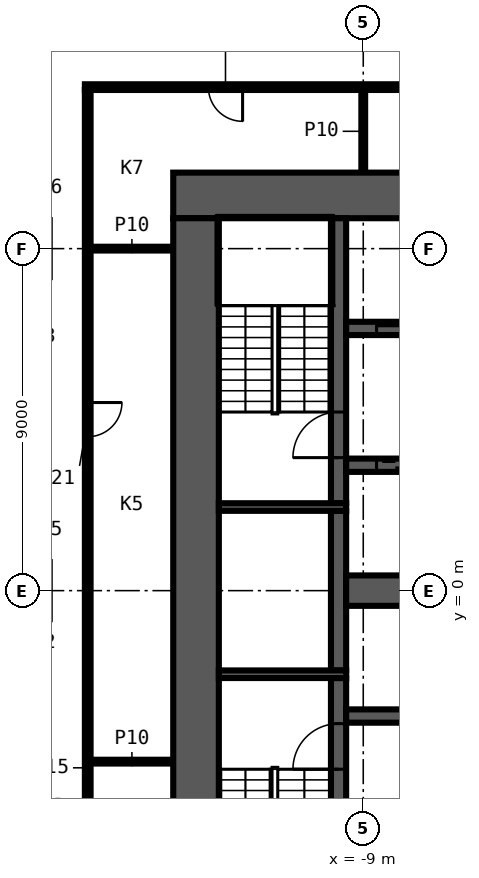
"""IFC4 building model, lengths in metres.
Left out: names, types, materials, properties, quantities, classifications, styles, units other than length and angle.
Written with IfcOpenShell. Run it as: python <this file> out.ifc"""

import sys

from ifc_helpers import new_model, si_unit, direction, frame, frame_2d, origin, place, context, subcontext, project, spatial, rectangle, extrude, element, fill, save


model = new_model("IFC4")
c1 = context("Model", 3, precision=1e-05, world=origin(), true_north=direction((0.0, 1.0)))
c2 = subcontext(c1, "Body", "Model", "MODEL_VIEW")
j1 = project(units=[si_unit("LENGTHUNIT", "METRE"), si_unit("PLANEANGLEUNIT", "RADIAN")], contexts=[c1])
p1 = place(None, origin())
s1 = spatial("IfcSite", under=j1, at=p1, CompositionType="ELEMENT")
p2 = place(p1, origin())
s2 = spatial("IfcBuilding", under=s1, at=p2, CompositionType="ELEMENT")
p3 = place(p2, frame((0.0, 0.0, 81.0)))
s3 = spatial("IfcBuildingStorey", under=s2, at=p3, CompositionType="ELEMENT", Elevation=81.0)
for number, where, z_axis, x_axis in (
    (1, (-16.175, -4.5, 0.0), (0.0, 0.0, 1.0), (1.0, 0.0, 0.0)),
    (2, (-16.175, 9.0, 0.0), (0.0, 0.0, 1.0), (1.0, 0.0, 0.0)),
):
    element("IfcWall", number, at=place(p3, frame(where, z_axis=z_axis, x_axis=x_axis)), inside=s3, PredefinedType="PARTITIONING", context=c2, shape_type="SweptSolid", body=[
        extrude(rectangle(XDim=2.175, YDim=0.1, at=frame_2d((1.087, 0.0))), origin(), (0.0, 0.0, 1.0), 3.3),
    ])
p4 = place(p3, frame((1.425, 13.25, 0.0), z_axis=(0.0, 0.0, 1.0), x_axis=(-1.0, 0.0, 0.0)))
e3 = element("IfcWall", 3, at=p4, inside=s3, PredefinedType="PARTITIONING", context=c2, shape_type="SweptSolid", body=[
    extrude(rectangle(XDim=17.75, YDim=0.15, at=frame_2d((8.875, 0.0))), origin(), (0.0, 0.0, 1.0), 3.3),
])
p5 = place(p4, frame((7.725, 0.0, 0.0)))
e4 = element("IfcOpeningElement", 4, at=p5, cuts=e3, PredefinedType="OPENING", context=c2, shape_type="SweptSolid", body=[
    extrude(rectangle(XDim=0.9, YDim=2.1, at=frame_2d((0.45, 1.05))), frame((0.0, 0.085, 0.0), z_axis=(0.0, -1.0, 0.0), x_axis=(1.0, 0.0, 0.0)), (0.0, 0.0, 1.0), 0.17),
])
p6 = place(p4, frame((13.6, 0.0, 0.0)))
e5 = element("IfcOpeningElement", 5, at=p6, cuts=e3, PredefinedType="OPENING", context=c2, shape_type="SweptSolid", body=[
    extrude(rectangle(XDim=0.9, YDim=2.1, at=frame_2d((0.45, 1.05))), frame((0.0, 0.085, 0.0), z_axis=(0.0, -1.0, 0.0), x_axis=(1.0, 0.0, 0.0)), (0.0, 0.0, 1.0), 0.17),
])
p7 = place(p3, frame((-9.0, 11.0, 0.0), z_axis=(0.0, 0.0, 1.0), x_axis=(0.0, 1.0, 0.0)))
e6 = element("IfcWall", 6, at=p7, inside=s3, PredefinedType="PARTITIONING", context=c2, shape_type="SweptSolid", body=[
    extrude(rectangle(XDim=2.175, YDim=0.1, at=frame_2d((1.087, 0.0))), origin(), (0.0, 0.0, 1.0), 3.3),
])
p8 = place(p3, frame((-16.25, 13.175, 0.0), z_axis=(0.0, 0.0, 1.0), x_axis=(0.0, -1.0, 0.0)))
e7 = element("IfcWall", 7, at=p8, inside=s3, PredefinedType="PARTITIONING", context=c2, shape_type="SweptSolid", body=[
    extrude(rectangle(XDim=26.35, YDim=0.15, at=frame_2d((13.175, 0.0))), origin(), (0.0, 0.0, 1.0), 3.3),
])
p9 = place(p8, frame((8.225, 0.0, 0.0)))
e8 = element("IfcOpeningElement", 8, at=p9, cuts=e7, PredefinedType="OPENING", context=c2, shape_type="SweptSolid", body=[
    extrude(rectangle(XDim=0.9, YDim=2.1, at=frame_2d((0.45, 1.05))), frame((0.0, 0.085, 0.0), z_axis=(0.0, -1.0, 0.0), x_axis=(1.0, 0.0, 0.0)), (0.0, 0.0, 1.0), 0.17),
])
p10 = place(p3, frame((-14.0, 10.4, 0.0), z_axis=(0.0, 0.0, 1.0), x_axis=(1.0, 0.0, 0.0)))
e9 = element("IfcWall", 9, at=p10, inside=s3, PredefinedType="SHEAR", context=c2, shape_type="SweptSolid", body=[
    extrude(rectangle(XDim=28.0, YDim=1.2, at=frame_2d((14.0, 0.0))), origin(), (0.0, 0.0, 1.0), 3.3),
])
p11 = place(p10, frame((15.9, 0.0, 0.0)))
e10 = element("IfcOpeningElement", 10, at=p11, cuts=e9, PredefinedType="OPENING", context=c2, shape_type="SweptSolid", body=[
    extrude(rectangle(XDim=1.6, YDim=2.1, at=frame_2d((0.8, 1.05))), frame((0.0, 0.61, 0.0), z_axis=(0.0, -1.0, 0.0), x_axis=(1.0, 0.0, 0.0)), (0.0, 0.0, 1.0), 1.22),
])
p12 = place(p3, frame((-13.4, -9.8, 0.0), z_axis=(0.0, 0.0, 1.0), x_axis=(0.0, 1.0, 0.0)))
e11 = element("IfcWall", 11, at=p12, inside=s3, PredefinedType="SHEAR", context=c2, shape_type="SweptSolid", body=[
    extrude(rectangle(XDim=19.6, YDim=1.2, at=frame_2d((9.8, 0.0))), origin(), (0.0, 0.0, 1.0), 3.3),
])
p13 = place(p3, frame((-9.65, -9.8, 0.0), z_axis=(0.0, 0.0, 1.0), x_axis=(0.0, 1.0, 0.0)))
e12 = element("IfcWall", 12, at=p13, inside=s3, PredefinedType="SHEAR", context=c2, shape_type="SweptSolid", body=[
    extrude(rectangle(XDim=7.5, YDim=0.4, at=frame_2d((3.75, 0.0))), origin(), (0.0, 0.0, 1.0), 3.3),
])
p14 = place(p13, frame((5.1, 0.0, 0.0)))
e13 = element("IfcOpeningElement", 13, at=p14, cuts=e12, PredefinedType="OPENING", context=c2, shape_type="SweptSolid", body=[
    extrude(rectangle(XDim=1.2, YDim=2.1, at=frame_2d((0.6, 1.05))), frame((0.0, 0.21, 0.0), z_axis=(0.0, -1.0, 0.0), x_axis=(1.0, 0.0, 0.0)), (0.0, 0.0, 1.0), 0.42),
])
p15 = place(p3, frame((-9.65, -2.1, 0.0), z_axis=(0.0, 0.0, 1.0), x_axis=(0.0, 1.0, 0.0)))
e14 = element("IfcWall", 14, at=p15, inside=s3, PredefinedType="SHEAR", context=c2, shape_type="SweptSolid", body=[
    extrude(rectangle(XDim=4.2, YDim=0.4, at=frame_2d((2.1, 0.0))), origin(), (0.0, 0.0, 1.0), 3.3),
])
p16 = place(p3, frame((-9.65, 2.3, 0.0), z_axis=(0.0, 0.0, 1.0), x_axis=(0.0, 1.0, 0.0)))
e15 = element("IfcWall", 15, at=p16, inside=s3, PredefinedType="SHEAR", context=c2, shape_type="SweptSolid", body=[
    extrude(rectangle(XDim=7.5, YDim=0.4, at=frame_2d((3.75, 0.0))), origin(), (0.0, 0.0, 1.0), 3.3),
])
p17 = place(p16, frame((1.2, 0.0, 0.0)))
e16 = element("IfcOpeningElement", 16, at=p17, cuts=e15, PredefinedType="OPENING", context=c2, shape_type="SweptSolid", body=[
    extrude(rectangle(XDim=1.2, YDim=2.1, at=frame_2d((0.6, 1.05))), frame((0.0, 0.21, 0.0), z_axis=(0.0, -1.0, 0.0), x_axis=(1.0, 0.0, 0.0)), (0.0, 0.0, 1.0), 0.42),
])
for number, where, z_axis, x_axis in (
    (17, (-9.45, 2.2, 0.0), (0.0, 0.0, 1.0), (-1.0, 0.0, 0.0)),
    (18, (-9.45, -2.2, 0.0), (0.0, 0.0, 1.0), (-1.0, 0.0, 0.0)),
):
    element("IfcWall", number, at=place(p3, frame(where, z_axis=z_axis, x_axis=x_axis)), inside=s3, PredefinedType="SHEAR", context=c2, shape_type="SweptSolid", body=[
        extrude(rectangle(XDim=3.35, YDim=0.2, at=frame_2d((1.675, 0.0))), origin(), (0.0, 0.0, 1.0), 3.3),
    ])
p18 = place(p3, frame((-9.45, 6.9, 0.0), z_axis=(0.0, 0.0, 1.0), x_axis=(1.0, 0.0, 0.0)))
e19 = element("IfcWall", 19, at=p18, inside=s3, PredefinedType="SHEAR", context=c2, shape_type="SweptSolid", body=[
    extrude(rectangle(XDim=18.9, YDim=0.35, at=frame_2d((9.45, 0.0))), origin(), (0.0, 0.0, 1.0), 3.3),
])
p19 = place(p18, frame((0.8, 0.0, 0.0)))
e20 = element("IfcOpeningElement", 20, at=p19, cuts=e19, PredefinedType="OPENING", context=c2, shape_type="SweptSolid", body=[
    extrude(rectangle(XDim=1.1, YDim=2.1, at=frame_2d((0.55, 1.05))), frame((0.0, 0.185, 0.0), z_axis=(0.0, -1.0, 0.0), x_axis=(1.0, 0.0, 0.0)), (0.0, 0.0, 1.0), 0.37),
])
p20 = place(p18, frame((3.5, 0.0, 0.0)))
e21 = element("IfcOpeningElement", 21, at=p20, cuts=e19, PredefinedType="OPENING", context=c2, shape_type="SweptSolid", body=[
    extrude(rectangle(XDim=1.1, YDim=2.1, at=frame_2d((0.55, 1.05))), frame((0.0, 0.185, 0.0), z_axis=(0.0, -1.0, 0.0), x_axis=(1.0, 0.0, 0.0)), (0.0, 0.0, 1.0), 0.37),
])
p21 = place(p18, frame((6.2, 0.0, 0.0)))
e22 = element("IfcOpeningElement", 22, at=p21, cuts=e19, PredefinedType="OPENING", context=c2, shape_type="SweptSolid", body=[
    extrude(rectangle(XDim=1.1, YDim=2.1, at=frame_2d((0.55, 1.05))), frame((0.0, 0.185, 0.0), z_axis=(0.0, -1.0, 0.0), x_axis=(1.0, 0.0, 0.0)), (0.0, 0.0, 1.0), 0.37),
])
p22 = place(p18, frame((8.9, 0.0, 0.0)))
e23 = element("IfcOpeningElement", 23, at=p22, cuts=e19, PredefinedType="OPENING", context=c2, shape_type="SweptSolid", body=[
    extrude(rectangle(XDim=1.1, YDim=2.1, at=frame_2d((0.55, 1.05))), frame((0.0, 0.185, 0.0), z_axis=(0.0, -1.0, 0.0), x_axis=(1.0, 0.0, 0.0)), (0.0, 0.0, 1.0), 0.37),
])
p23 = place(p18, frame((11.55, 0.0, 0.0)))
e24 = element("IfcOpeningElement", 24, at=p23, cuts=e19, PredefinedType="OPENING", context=c2, shape_type="SweptSolid", body=[
    extrude(rectangle(XDim=1.2, YDim=2.1, at=frame_2d((0.6, 1.05))), frame((0.0, 0.185, 0.0), z_axis=(0.0, -1.0, 0.0), x_axis=(1.0, 0.0, 0.0)), (0.0, 0.0, 1.0), 0.37),
])
p24 = place(p18, frame((14.3, 0.0, 0.0)))
e25 = element("IfcOpeningElement", 25, at=p24, cuts=e19, PredefinedType="OPENING", context=c2, shape_type="SweptSolid", body=[
    extrude(rectangle(XDim=1.1, YDim=2.1, at=frame_2d((0.55, 1.05))), frame((0.0, 0.185, 0.0), z_axis=(0.0, -1.0, 0.0), x_axis=(1.0, 0.0, 0.0)), (0.0, 0.0, 1.0), 0.37),
])
p25 = place(p18, frame((17.0, 0.0, 0.0)))
e26 = element("IfcOpeningElement", 26, at=p25, cuts=e19, PredefinedType="OPENING", context=c2, shape_type="SweptSolid", body=[
    extrude(rectangle(XDim=1.1, YDim=2.1, at=frame_2d((0.55, 1.05))), frame((0.0, 0.185, 0.0), z_axis=(0.0, -1.0, 0.0), x_axis=(1.0, 0.0, 0.0)), (0.0, 0.0, 1.0), 0.37),
])
p26 = place(p3, frame((9.45, 3.3, 0.0), z_axis=(0.0, 0.0, 1.0), x_axis=(-1.0, 0.0, 0.0)))
e27 = element("IfcWall", 27, at=p26, inside=s3, PredefinedType="SHEAR", context=c2, shape_type="SweptSolid", body=[
    extrude(rectangle(XDim=18.9, YDim=0.35, at=frame_2d((9.45, 0.0))), origin(), (0.0, 0.0, 1.0), 3.3),
])
p27 = place(p26, frame((17.0, 0.0, 0.0)))
e28 = element("IfcOpeningElement", 28, at=p27, cuts=e27, PredefinedType="OPENING", context=c2, shape_type="SweptSolid", body=[
    extrude(rectangle(XDim=1.1, YDim=2.1, at=frame_2d((0.55, 1.05))), frame((0.0, 0.185, 0.0), z_axis=(0.0, -1.0, 0.0), x_axis=(1.0, 0.0, 0.0)), (0.0, 0.0, 1.0), 0.37),
])
p28 = place(p26, frame((14.3, 0.0, 0.0)))
e29 = element("IfcOpeningElement", 29, at=p28, cuts=e27, PredefinedType="OPENING", context=c2, shape_type="SweptSolid", body=[
    extrude(rectangle(XDim=1.1, YDim=2.1, at=frame_2d((0.55, 1.05))), frame((0.0, 0.185, 0.0), z_axis=(0.0, -1.0, 0.0), x_axis=(1.0, 0.0, 0.0)), (0.0, 0.0, 1.0), 0.37),
])
p29 = place(p26, frame((11.6, 0.0, 0.0)))
e30 = element("IfcOpeningElement", 30, at=p29, cuts=e27, PredefinedType="OPENING", context=c2, shape_type="SweptSolid", body=[
    extrude(rectangle(XDim=1.1, YDim=2.1, at=frame_2d((0.55, 1.05))), frame((0.0, 0.185, 0.0), z_axis=(0.0, -1.0, 0.0), x_axis=(1.0, 0.0, 0.0)), (0.0, 0.0, 1.0), 0.37),
])
p30 = place(p26, frame((8.9, 0.0, 0.0)))
e31 = element("IfcOpeningElement", 31, at=p30, cuts=e27, PredefinedType="OPENING", context=c2, shape_type="SweptSolid", body=[
    extrude(rectangle(XDim=1.1, YDim=2.1, at=frame_2d((0.55, 1.05))), frame((0.0, 0.185, 0.0), z_axis=(0.0, -1.0, 0.0), x_axis=(1.0, 0.0, 0.0)), (0.0, 0.0, 1.0), 0.37),
])
p31 = place(p26, frame((6.2, 0.0, 0.0)))
e32 = element("IfcOpeningElement", 32, at=p31, cuts=e27, PredefinedType="OPENING", context=c2, shape_type="SweptSolid", body=[
    extrude(rectangle(XDim=1.1, YDim=2.1, at=frame_2d((0.55, 1.05))), frame((0.0, 0.185, 0.0), z_axis=(0.0, -1.0, 0.0), x_axis=(1.0, 0.0, 0.0)), (0.0, 0.0, 1.0), 0.37),
])
p32 = place(p26, frame((3.5, 0.0, 0.0)))
e33 = element("IfcOpeningElement", 33, at=p32, cuts=e27, PredefinedType="OPENING", context=c2, shape_type="SweptSolid", body=[
    extrude(rectangle(XDim=1.1, YDim=2.1, at=frame_2d((0.55, 1.05))), frame((0.0, 0.185, 0.0), z_axis=(0.0, -1.0, 0.0), x_axis=(1.0, 0.0, 0.0)), (0.0, 0.0, 1.0), 0.37),
])
p33 = place(p26, frame((0.9, 0.0, 0.0)))
e34 = element("IfcOpeningElement", 34, at=p33, cuts=e27, PredefinedType="OPENING", context=c2, shape_type="SweptSolid", body=[
    extrude(rectangle(XDim=0.9, YDim=2.1, at=frame_2d((0.45, 1.05))), frame((0.0, 0.185, 0.0), z_axis=(0.0, -1.0, 0.0), x_axis=(1.0, 0.0, 0.0)), (0.0, 0.0, 1.0), 0.37),
])
p34 = place(p3, frame((-9.45, -3.3, 0.0), z_axis=(0.0, 0.0, 1.0), x_axis=(1.0, 0.0, 0.0)))
e35 = element("IfcWall", 35, at=p34, inside=s3, PredefinedType="SHEAR", context=c2, shape_type="SweptSolid", body=[
    extrude(rectangle(XDim=18.9, YDim=0.35, at=frame_2d((9.45, 0.0))), origin(), (0.0, 0.0, 1.0), 3.3),
])
p35 = place(p34, frame((17.0, 0.0, 0.0)))
e36 = element("IfcOpeningElement", 36, at=p35, cuts=e35, PredefinedType="OPENING", context=c2, shape_type="SweptSolid", body=[
    extrude(rectangle(XDim=1.1, YDim=2.1, at=frame_2d((0.55, 1.05))), frame((0.0, 0.185, 0.0), z_axis=(0.0, -1.0, 0.0), x_axis=(1.0, 0.0, 0.0)), (0.0, 0.0, 1.0), 0.37),
])
p36 = place(p34, frame((3.6, 0.0, 0.0)))
e37 = element("IfcOpeningElement", 37, at=p36, cuts=e35, PredefinedType="OPENING", context=c2, shape_type="SweptSolid", body=[
    extrude(rectangle(XDim=0.9, YDim=2.1, at=frame_2d((0.45, 1.05))), frame((0.0, 0.185, 0.0), z_axis=(0.0, -1.0, 0.0), x_axis=(1.0, 0.0, 0.0)), (0.0, 0.0, 1.0), 0.37),
])
p37 = place(p34, frame((9.0, 0.0, 0.0)))
e38 = element("IfcOpeningElement", 38, at=p37, cuts=e35, PredefinedType="OPENING", context=c2, shape_type="SweptSolid", body=[
    extrude(rectangle(XDim=0.9, YDim=2.1, at=frame_2d((0.45, 1.05))), frame((0.0, 0.185, 0.0), z_axis=(0.0, -1.0, 0.0), x_axis=(1.0, 0.0, 0.0)), (0.0, 0.0, 1.0), 0.37),
])
p38 = place(p3, frame((-9.45, 0.0, 0.0), z_axis=(0.0, 0.0, 1.0), x_axis=(1.0, 0.0, 0.0)))
e39 = element("IfcWall", 39, at=p38, inside=s3, PredefinedType="SHEAR", context=c2, shape_type="SweptSolid", body=[
    extrude(rectangle(XDim=18.9, YDim=0.8, at=frame_2d((9.45, 0.0))), origin(), (0.0, 0.0, 1.0), 3.3),
])
p39 = place(p6, origin())
e40 = element("IfcDoor", 40, at=p39, inside=s3, OperationType="SINGLE_SWING_RIGHT", PredefinedType="DOOR", context=c2, shape_type="SweptSolid", body=[
    extrude(rectangle(XDim=0.9, YDim=2.1, at=frame_2d((0.45, 1.05))), frame((0.0, 0.025, 0.0), z_axis=(0.0, -1.0, 0.0), x_axis=(1.0, 0.0, 0.0)), (0.0, 0.0, 1.0), 0.05),
])
fill(e5, e40)
p40 = place(p9, origin())
e41 = element("IfcDoor", 41, at=p40, inside=s3, OperationType="SINGLE_SWING_LEFT", PredefinedType="DOOR", context=c2, shape_type="SweptSolid", body=[
    extrude(rectangle(XDim=0.9, YDim=2.1, at=frame_2d((0.45, 1.05))), frame((0.0, 0.025, 0.0), z_axis=(0.0, -1.0, 0.0), x_axis=(1.0, 0.0, 0.0)), (0.0, 0.0, 1.0), 0.05),
])
fill(e8, e41)
p41 = place(p19, origin())
e42 = element("IfcDoor", 42, at=p41, inside=s3, OperationType="DOUBLE_DOOR_SLIDING", PredefinedType="DOOR", context=c2, shape_type="SweptSolid", body=[
    extrude(rectangle(XDim=1.1, YDim=2.1, at=frame_2d((0.55, 1.05))), frame((0.0, 0.025, 0.0), z_axis=(0.0, -1.0, 0.0), x_axis=(1.0, 0.0, 0.0)), (0.0, 0.0, 1.0), 0.05),
])
fill(e20, e42)
p42 = place(p27, origin())
e43 = element("IfcDoor", 43, at=p42, inside=s3, OperationType="DOUBLE_DOOR_SLIDING", PredefinedType="DOOR", context=c2, shape_type="SweptSolid", body=[
    extrude(rectangle(XDim=1.1, YDim=2.1, at=frame_2d((0.55, 1.05))), frame((0.0, 0.025, 0.0), z_axis=(0.0, -1.0, 0.0), x_axis=(1.0, 0.0, 0.0)), (0.0, 0.0, 1.0), 0.05),
])
fill(e28, e43)
p43 = place(p17, origin())
e44 = element("IfcDoor", 44, at=p43, inside=s3, OperationType="SINGLE_SWING_RIGHT", PredefinedType="DOOR", context=c2, shape_type="SweptSolid", body=[
    extrude(rectangle(XDim=1.2, YDim=2.1, at=frame_2d((0.6, 1.05))), frame((0.0, 0.025, 0.0), z_axis=(0.0, -1.0, 0.0), x_axis=(1.0, 0.0, 0.0)), (0.0, 0.0, 1.0), 0.05),
])
fill(e16, e44)
p44 = place(p14, origin())
e45 = element("IfcDoor", 45, at=p44, inside=s3, OperationType="SINGLE_SWING_LEFT", PredefinedType="DOOR", context=c2, shape_type="SweptSolid", body=[
    extrude(rectangle(XDim=1.2, YDim=2.1, at=frame_2d((0.6, 1.05))), frame((0.0, 0.025, 0.0), z_axis=(0.0, -1.0, 0.0), x_axis=(1.0, 0.0, 0.0)), (0.0, 0.0, 1.0), 0.05),
])
fill(e13, e45)
save(model, sys.argv[1])
